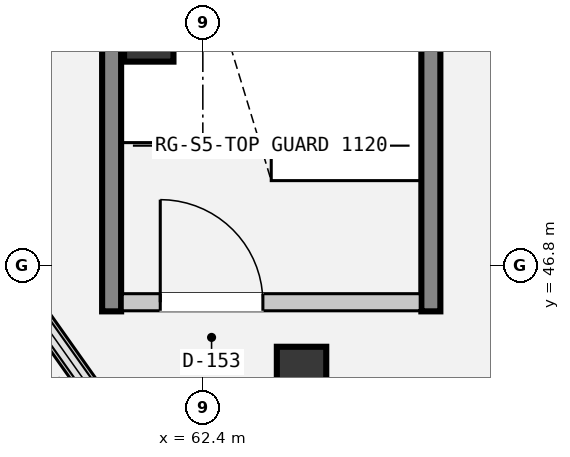
"""IFC4 building model, lengths in metres.
Left out: names, types, materials, properties, quantities, classifications, styles, units other than length and angle.
Written with IfcOpenShell. Run it as: python <this file> out.ifc"""

import sys

from ifc_helpers import new_model, si_unit, direction, frame, frame_2d, origin, origin_2d, place, context, subcontext, project, spatial, rectangle, circle, extrude, element, fill, save


model = new_model("IFC4")
c1 = context("Model", 3, precision=1e-05, world=origin(), true_north=direction((0.0, 1.0)))
c2 = subcontext(c1, "Body", "Model", "MODEL_VIEW")
j1 = project(units=[si_unit("LENGTHUNIT", "METRE"), si_unit("PLANEANGLEUNIT", "RADIAN")], contexts=[c1])
p1 = place(None, origin())
s1 = spatial("IfcSite", under=j1, at=p1, CompositionType="ELEMENT")
p2 = place(p1, origin())
s2 = spatial("IfcBuilding", under=s1, at=p2, CompositionType="ELEMENT")
p3 = place(p2, frame((0.0, 0.0, 10.2)))
s3 = spatial("IfcBuildingStorey", under=s2, at=p3, CompositionType="ELEMENT", Elevation=10.2)
for number, where, z_axis, x_axis in (
    (1, (61.689, 49.811, 0.0), (0.0, 0.0, 1.0), (1.0, 0.0, 0.0)),
    (2, (63.699, 45.409, 0.0), (0.0, 0.0, 1.0), (1.0, 0.0, 0.0)),
):
    element("IfcColumn", number, at=place(p3, frame(where, z_axis=z_axis, x_axis=x_axis)), inside=s3, PredefinedType="COLUMN", context=c2, shape_type="SweptSolid", body=[
        extrude(circle(Radius=0.325, at=origin_2d()), origin(), (0.0, 0.0, 1.0), 6.2),
    ])
for number, where, z_axis, x_axis in (
    (3, (61.2, 46.2, 0.0), (0.0, 0.0, 1.0), (0.0, 1.0, 0.0)),
    (4, (65.4, 46.2, 0.0), (0.0, 0.0, 1.0), (0.0, 1.0, 0.0)),
):
    element("IfcWall", number, at=place(p3, frame(where, z_axis=z_axis, x_axis=x_axis)), inside=s3, PredefinedType="SHEAR", context=c2, shape_type="SweptSolid", body=[
        extrude(rectangle(XDim=8.4, YDim=0.25, at=frame_2d((4.2, 0.0))), origin(), (0.0, 0.0, 1.0), 4.8),
    ])
p4 = place(p3, frame((59.896, 46.629, 0.0), z_axis=(0.0, 0.0, 1.0), x_axis=(0.577602786986, -0.816317965297, 0.0)))
e5 = element("IfcWall", 5, at=p4, inside=s3, PredefinedType="SOLIDWALL", context=c2, shape_type="SweptSolid", body=[
    extrude(rectangle(XDim=4.053, YDim=0.275, at=frame_2d((2.026, 0.0))), origin(), (0.0, 0.0, 1.0), 1.02),
])
p5 = place(p3, frame((61.34, 46.32, 0.0), z_axis=(0.0, 0.0, 1.0), x_axis=(1.0, 0.0, 0.0)))
e6 = element("IfcWall", 6, at=p5, inside=s3, PredefinedType="PARTITIONING", context=c2, shape_type="SweptSolid", body=[
    extrude(rectangle(XDim=3.92, YDim=0.225, at=frame_2d((1.96, 0.0))), origin(), (0.0, 0.0, 1.0), 3.51),
])
p6 = place(p5, frame((0.5, 0.0, 0.0)))
e7 = element("IfcOpeningElement", 7, at=p6, cuts=e6, PredefinedType="OPENING", context=c2, shape_type="SweptSolid", body=[
    extrude(rectangle(XDim=1.35, YDim=2.2, at=frame_2d((0.675, 1.1))), frame((0.0, 0.123, 0.0), z_axis=(0.0, -1.0, 0.0), x_axis=(1.0, 0.0, 0.0)), (0.0, 0.0, 1.0), 0.245),
])
p7 = place(p6, origin())
e8 = element("IfcDoor", 8, at=p7, inside=s3, OperationType="SINGLE_SWING_LEFT", PredefinedType="DOOR", context=c2, shape_type="SweptSolid", body=[
    extrude(rectangle(XDim=1.35, YDim=2.2, at=frame_2d((0.675, 1.1))), frame((0.0, 0.025, 0.0), z_axis=(0.0, -1.0, 0.0), x_axis=(1.0, 0.0, 0.0)), (0.0, 0.0, 1.0), 0.05),
])
fill(e7, e8)
save(model, sys.argv[1])
